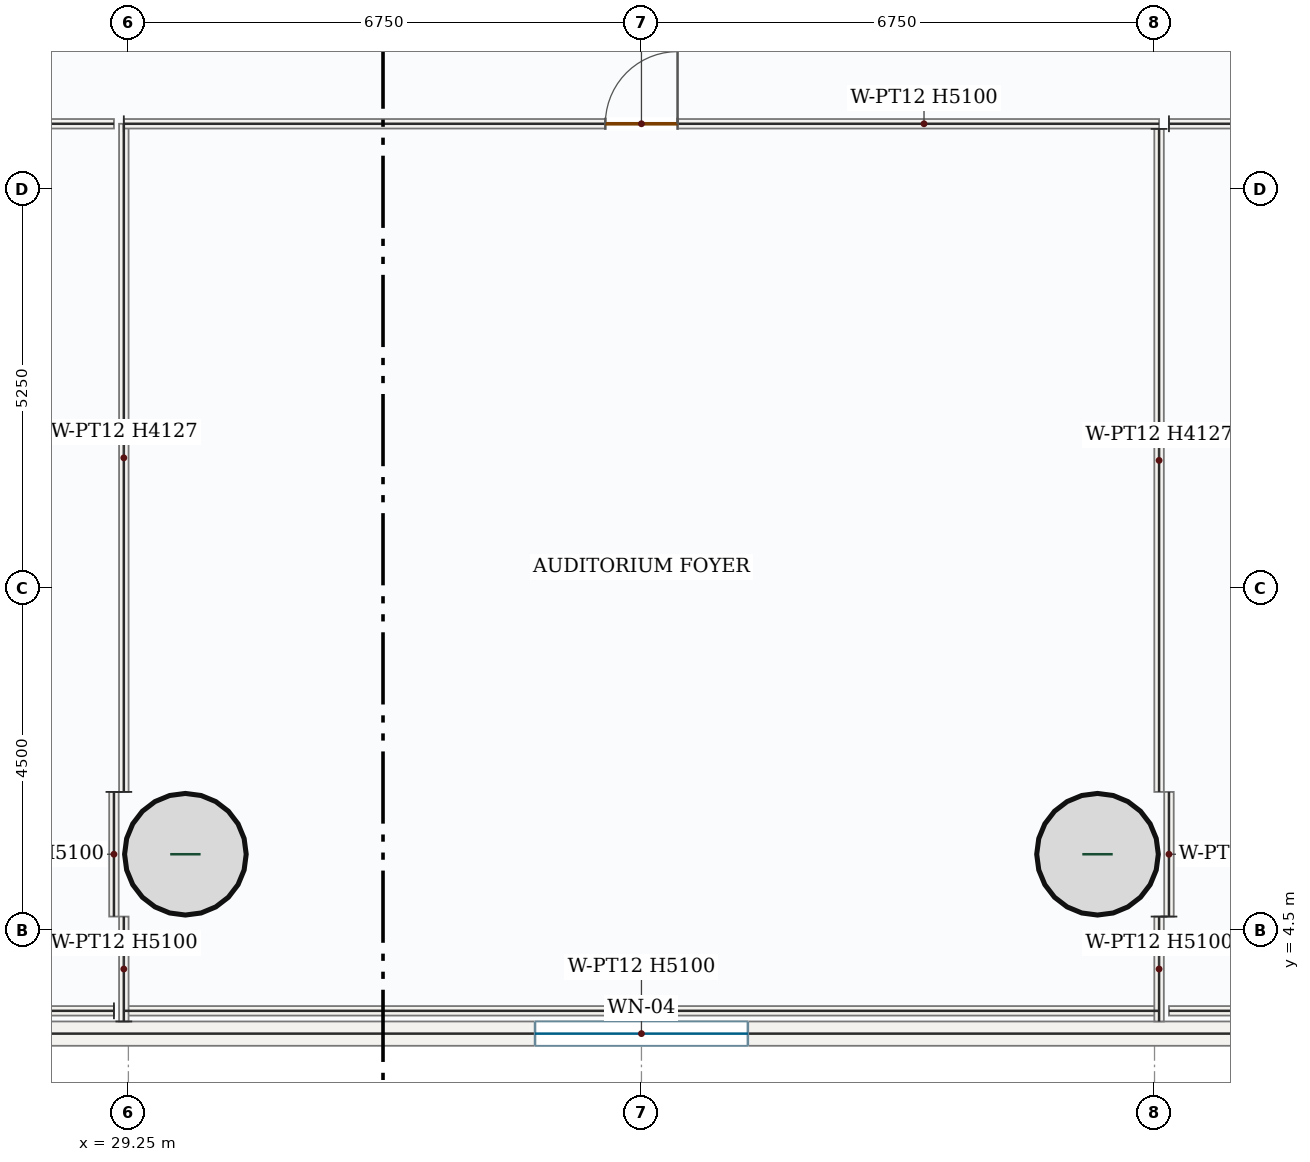
"""IFC4 building model, lengths in metres.
Left out: names, types, materials, properties, quantities, classifications, styles, units other than length and angle.
Written with IfcOpenShell. Run it as: python <this file> out.ifc"""

import sys

from ifc_helpers import new_model, si_unit, direction, frame, frame_2d, origin, origin_2d, place, context, subcontext, project, spatial, rectangle, hollow_circle, extrude, source, transform, mapped, element, fill, save


model = new_model("IFC4")
c1 = context("Model", 3, precision=1e-05, world=origin(), true_north=direction((0.0, 1.0)))
c2 = subcontext(c1, "Body", "Model", "MODEL_VIEW")
j1 = project(units=[si_unit("LENGTHUNIT", "METRE"), si_unit("PLANEANGLEUNIT", "RADIAN")], contexts=[c1])
p1 = place(None, origin())
s1 = spatial("IfcSite", under=j1, at=p1, CompositionType="ELEMENT")
p2 = place(p1, origin())
s2 = spatial("IfcBuilding", under=s1, at=p2, CompositionType="ELEMENT")
p3 = place(p2, frame((0.0, 0.0, 7.2)))
s3 = spatial("IfcBuildingStorey", under=s2, at=p3, CompositionType="ELEMENT", Elevation=7.2)
m1 = source(origin(), c2, "Body", "SweptSolid", [
    extrude(hollow_circle(Radius=0.8, WallThickness=0.06, at=origin_2d()), origin(), (0.0, 0.0, 1.0), 5.4),
])
for number, where, z_axis, x_axis in (
    (1, (30.0, 5.5, 0.0), (0.0, 0.0, 1.0), (1.0, 0.0, 0.0)),
    (2, (42.0, 5.5, 0.0), (0.0, 0.0, 1.0), (1.0, 0.0, 0.0)),
):
    element("IfcColumn", number, at=place(p3, frame(where, z_axis=z_axis, x_axis=x_axis)), inside=s3, PredefinedType="COLUMN", context=c2, shape_type="MappedRepresentation", body=[
        mapped(m1, transform((0.0, 0.0, 0.0), x_axis=(1.0, 0.0, 0.0), y_axis=(0.0, 1.0, 0.0), z_axis=(0.0, 0.0, 1.0), scale=1.0)),
    ])
p4 = place(p3, frame((67.16, 3.14, 0.0), z_axis=(0.0, 0.0, 1.0), x_axis=(-1.0, 0.0, 0.0)))
e3 = element("IfcWall", 3, at=p4, inside=s3, PredefinedType="SOLIDWALL", context=c2, shape_type="SweptSolid", body=[
    extrude(rectangle(XDim=62.32, YDim=0.32, at=frame_2d((31.16, 0.0))), origin(), (0.0, 0.0, 1.0), 5.1),
])
p5 = place(p4, frame((29.76, 0.0, 0.85)))
e4 = element("IfcOpeningElement", 4, at=p5, cuts=e3, PredefinedType="OPENING", context=c2, shape_type="SweptSolid", body=[
    extrude(rectangle(XDim=2.8, YDim=2.4, at=frame_2d((1.4, 1.2))), frame((0.0, 0.17, 0.0), z_axis=(0.0, -1.0, 0.0), x_axis=(1.0, 0.0, 0.0)), (0.0, 0.0, 1.0), 0.34),
])
m2 = source(origin(), c2, "Body", "SweptSolid", [
    extrude(rectangle(XDim=13.62, YDim=0.125, at=frame_2d((6.81, 0.0))), origin(), (0.0, 0.0, 1.0), 5.1),
])
p6 = place(p3, frame((42.81, 3.44, 0.0), z_axis=(0.0, 0.0, 1.0), x_axis=(-1.0, 0.0, 0.0)))
e5 = element("IfcWall", 5, at=p6, inside=s3, PredefinedType="PARTITIONING", context=c2, shape_type="MappedRepresentation", body=[
    mapped(m2, transform((0.0, 0.0, 0.0), x_axis=(1.0, 0.0, 0.0), y_axis=(0.0, 1.0, 0.0), z_axis=(0.0, 0.0, 1.0), scale=1.0)),
])
m3 = source(origin(), c2, "Body", "SweptSolid", [
    extrude(rectangle(XDim=1.38, YDim=0.125, at=frame_2d((0.69, 0.0))), origin(), (0.0, 0.0, 1.0), 5.1),
])
p7 = place(p3, frame((29.19, 3.3, 0.0), z_axis=(0.0, 0.0, 1.0), x_axis=(0.0, 1.0, 0.0)))
e6 = element("IfcWall", 6, at=p7, inside=s3, PredefinedType="PARTITIONING", context=c2, shape_type="MappedRepresentation", body=[
    mapped(m3, transform((0.0, 0.0, 0.0), x_axis=(1.0, 0.0, 0.0), y_axis=(0.0, 1.0, 0.0), z_axis=(0.0, 0.0, 1.0), scale=1.0)),
])
m4 = source(origin(), c2, "Body", "SweptSolid", [
    extrude(rectangle(XDim=8.79, YDim=0.125, at=frame_2d((4.395, 0.0))), origin(), (0.0, 0.0, 1.0), 4.127),
])
p8 = place(p3, frame((29.19, 6.32, 0.0), z_axis=(0.0, 0.0, 1.0), x_axis=(0.0, 1.0, 0.0)))
e7 = element("IfcWall", 7, at=p8, inside=s3, PredefinedType="PARTITIONING", context=c2, shape_type="MappedRepresentation", body=[
    mapped(m4, transform((0.0, 0.0, 0.0), x_axis=(1.0, 0.0, 0.0), y_axis=(0.0, 1.0, 0.0), z_axis=(0.0, 0.0, 1.0), scale=1.0)),
])
p9 = place(p3, frame((29.19, 15.11, 0.0), z_axis=(0.0, 0.0, 1.0), x_axis=(1.0, 0.0, 0.0)))
e8 = element("IfcWall", 8, at=p9, inside=s3, PredefinedType="PARTITIONING", context=c2, shape_type="SweptSolid", body=[
    extrude(rectangle(XDim=13.62, YDim=0.125, at=frame_2d((6.81, 0.0))), origin(), (0.0, 0.0, 1.0), 5.1),
])
p10 = place(p9, frame((6.335, 0.0, 0.0)))
e9 = element("IfcOpeningElement", 9, at=p10, cuts=e8, PredefinedType="OPENING", context=c2, shape_type="SweptSolid", body=[
    extrude(rectangle(XDim=0.95, YDim=2.15, at=frame_2d((0.475, 1.075))), frame((0.0, 0.073, 0.0), z_axis=(0.0, -1.0, 0.0), x_axis=(1.0, 0.0, 0.0)), (0.0, 0.0, 1.0), 0.145),
])
m5 = source(origin(), c2, "Body", "SweptSolid", [
    extrude(rectangle(XDim=8.722, YDim=0.125, at=frame_2d((4.361, 0.0))), origin(), (0.0, 0.0, 1.0), 4.127),
])
p11 = place(p3, frame((42.81, 15.042, 0.0), z_axis=(0.0, 0.0, 1.0), x_axis=(0.0, -1.0, 0.0)))
e10 = element("IfcWall", 10, at=p11, inside=s3, PredefinedType="PARTITIONING", context=c2, shape_type="MappedRepresentation", body=[
    mapped(m5, transform((0.0, 0.0, 0.0), x_axis=(1.0, 0.0, 0.0), y_axis=(0.0, 1.0, 0.0), z_axis=(0.0, 0.0, 1.0), scale=1.0)),
])
p12 = place(p3, frame((42.81, 4.68, 0.0), z_axis=(0.0, 0.0, 1.0), x_axis=(0.0, -1.0, 0.0)))
e11 = element("IfcWall", 11, at=p12, inside=s3, PredefinedType="PARTITIONING", context=c2, shape_type="MappedRepresentation", body=[
    mapped(m3, transform((0.0, 0.0, 0.0), x_axis=(1.0, 0.0, 0.0), y_axis=(0.0, 1.0, 0.0), z_axis=(0.0, 0.0, 1.0), scale=1.0)),
])
m6 = source(origin(), c2, "Body", "SweptSolid", [
    extrude(rectangle(XDim=10.49, YDim=0.125, at=frame_2d((5.245, 0.0))), origin(), (0.0, 0.0, 1.0), 5.1),
])
p13 = place(p3, frame((29.06, 3.44, 0.0), z_axis=(0.0, 0.0, 1.0), x_axis=(-1.0, 0.0, 0.0)))
e12 = element("IfcWall", 12, at=p13, inside=s3, PredefinedType="PARTITIONING", context=c2, shape_type="MappedRepresentation", body=[
    mapped(m6, transform((0.0, 0.0, 0.0), x_axis=(1.0, 0.0, 0.0), y_axis=(0.0, 1.0, 0.0), z_axis=(0.0, 0.0, 1.0), scale=1.0)),
])
m7 = source(origin(), c2, "Body", "SweptSolid", [
    extrude(rectangle(XDim=6.554, YDim=0.125, at=frame_2d((3.277, 0.0))), origin(), (0.0, 0.0, 1.0), 5.1),
])
p14 = place(p3, frame((22.506, 15.11, 0.0), z_axis=(0.0, 0.0, 1.0), x_axis=(1.0, 0.0, 0.0)))
e13 = element("IfcWall", 13, at=p14, inside=s3, PredefinedType="PARTITIONING", context=c2, shape_type="MappedRepresentation", body=[
    mapped(m7, transform((0.0, 0.0, 0.0), x_axis=(1.0, 0.0, 0.0), y_axis=(0.0, 1.0, 0.0), z_axis=(0.0, 0.0, 1.0), scale=1.0)),
])
m8 = source(origin(), c2, "Body", "SweptSolid", [
    extrude(rectangle(XDim=1.64, YDim=0.125, at=frame_2d((0.82, 0.0))), origin(), (0.0, 0.0, 1.0), 5.1),
])
p15 = place(p3, frame((29.06, 6.32, 0.0), z_axis=(0.0, 0.0, 1.0), x_axis=(0.0, -1.0, 0.0)))
e14 = element("IfcWall", 14, at=p15, inside=s3, PredefinedType="PARTITIONING", context=c2, shape_type="MappedRepresentation", body=[
    mapped(m8, transform((0.0, 0.0, 0.0), x_axis=(1.0, 0.0, 0.0), y_axis=(0.0, 1.0, 0.0), z_axis=(0.0, 0.0, 1.0), scale=1.0)),
])
p16 = place(p3, frame((53.43, 3.44, 0.0), z_axis=(0.0, 0.0, 1.0), x_axis=(-1.0, 0.0, 0.0)))
e15 = element("IfcWall", 15, at=p16, inside=s3, PredefinedType="PARTITIONING", context=c2, shape_type="MappedRepresentation", body=[
    mapped(m6, transform((0.0, 0.0, 0.0), x_axis=(1.0, 0.0, 0.0), y_axis=(0.0, 1.0, 0.0), z_axis=(0.0, 0.0, 1.0), scale=1.0)),
])
p17 = place(p3, frame((42.94, 4.68, 0.0), z_axis=(0.0, 0.0, 1.0), x_axis=(0.0, 1.0, 0.0)))
e16 = element("IfcWall", 16, at=p17, inside=s3, PredefinedType="PARTITIONING", context=c2, shape_type="MappedRepresentation", body=[
    mapped(m8, transform((0.0, 0.0, 0.0), x_axis=(1.0, 0.0, 0.0), y_axis=(0.0, 1.0, 0.0), z_axis=(0.0, 0.0, 1.0), scale=1.0)),
])
p18 = place(p3, frame((42.94, 15.11, 0.0), z_axis=(0.0, 0.0, 1.0), x_axis=(1.0, 0.0, 0.0)))
e17 = element("IfcWall", 17, at=p18, inside=s3, PredefinedType="PARTITIONING", context=c2, shape_type="MappedRepresentation", body=[
    mapped(m7, transform((0.0, 0.0, 0.0), x_axis=(1.0, 0.0, 0.0), y_axis=(0.0, 1.0, 0.0), z_axis=(0.0, 0.0, 1.0), scale=1.0)),
])
m9 = source(origin(), c2, "Body", "SweptSolid", [
    extrude(rectangle(XDim=2.8, YDim=2.4, at=frame_2d((1.4, 1.2))), frame((0.0, 0.03, 0.0), z_axis=(0.0, -1.0, 0.0), x_axis=(1.0, 0.0, 0.0)), (0.0, 0.0, 1.0), 0.06),
])
p19 = place(p5, origin())
e18 = element("IfcWindow", 18, at=p19, inside=s3, PartitioningType="TRIPLE_PANEL_VERTICAL", PredefinedType="WINDOW", context=c2, shape_type="MappedRepresentation", body=[
    mapped(m9, transform((0.0, 0.0, 0.0), x_axis=(1.0, 0.0, 0.0), y_axis=(0.0, 1.0, 0.0), z_axis=(0.0, 0.0, 1.0), scale=1.0)),
])
fill(e4, e18)
m10 = source(origin(), c2, "Body", "SweptSolid", [
    extrude(rectangle(XDim=0.95, YDim=2.15, at=frame_2d((0.475, 1.075))), frame((0.0, 0.025, 0.0), z_axis=(0.0, -1.0, 0.0), x_axis=(1.0, 0.0, 0.0)), (0.0, 0.0, 1.0), 0.05),
])
p20 = place(p10, origin())
e19 = element("IfcDoor", 19, at=p20, inside=s3, OperationType="SINGLE_SWING_RIGHT", PredefinedType="DOOR", context=c2, shape_type="MappedRepresentation", body=[
    mapped(m10, transform((0.0, 0.0, 0.0), x_axis=(1.0, 0.0, 0.0), y_axis=(0.0, 1.0, 0.0), z_axis=(0.0, 0.0, 1.0), scale=1.0)),
])
fill(e9, e19)
save(model, sys.argv[1])
